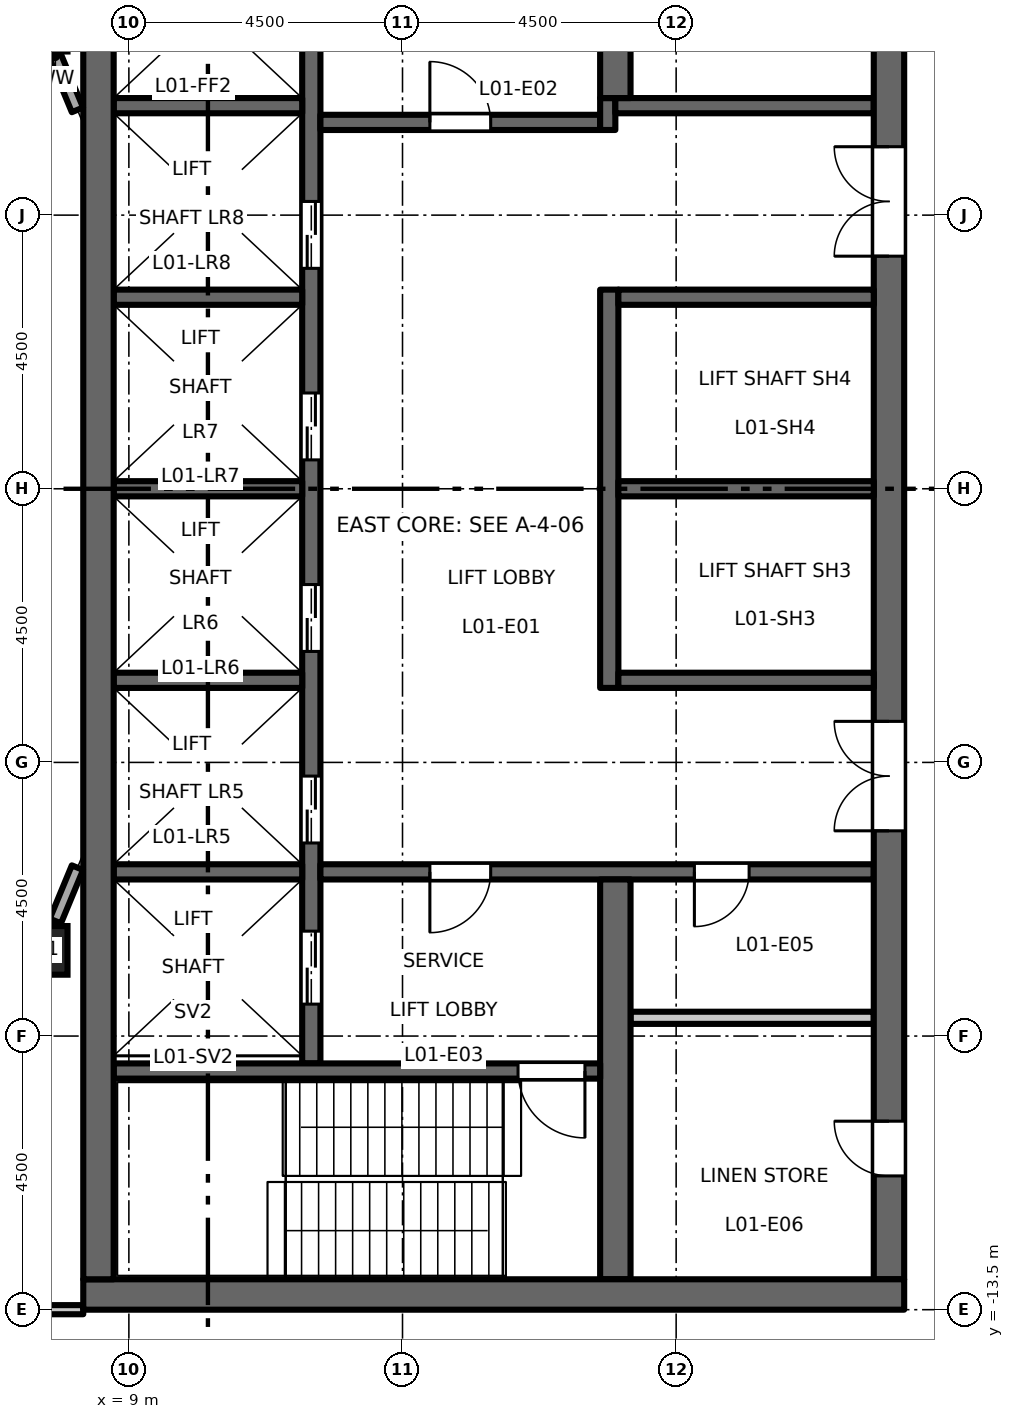
"""IFC4 building model, lengths in metres.
Left out: names, types, materials, properties, quantities, classifications, styles, units other than length and angle.
Written with IfcOpenShell. Run it as: python <this file> out.ifc"""

import sys

from ifc_helpers import new_model, si_unit, direction, frame, frame_2d, origin, origin_2d, place, context, subcontext, project, spatial, rectangle, hollow_rectangle, extrude, element, fill, save


model = new_model("IFC4")
c1 = context("Model", 3, precision=1e-05, world=origin(), true_north=direction((0.0, 1.0)))
c2 = subcontext(c1, "Body", "Model", "MODEL_VIEW")
j1 = project(units=[si_unit("LENGTHUNIT", "METRE"), si_unit("PLANEANGLEUNIT", "RADIAN")], contexts=[c1])
p1 = place(None, origin())
s1 = spatial("IfcSite", under=j1, at=p1, CompositionType="ELEMENT")
p2 = place(p1, origin())
s2 = spatial("IfcBuilding", under=s1, at=p2, CompositionType="ELEMENT")
p3 = place(p2, frame((0.0, 0.0, 7.2)))
s3 = spatial("IfcBuildingStorey", under=s2, at=p3, CompositionType="ELEMENT", Elevation=7.2)
p4 = place(p3, frame((7.591, -7.591, 0.0), z_axis=(0.0, 0.0, 1.0), x_axis=(1.0, 0.0, 0.0)))
e1 = element("IfcColumn", 1, at=p4, inside=s3, PredefinedType="COLUMN", context=c2, shape_type="SweptSolid", body=[
    extrude(hollow_rectangle(XDim=0.8, YDim=0.8, WallThickness=0.05, at=origin_2d()), origin(), (0.0, 0.0, 1.0), 5.0),
])
p5 = place(p3, frame((12.0, -9.45, 0.0), z_axis=(0.0, 0.0, 1.0), x_axis=(0.0, 1.0, 0.0)))
e2 = element("IfcWall", 2, at=p5, inside=s3, PredefinedType="SHEAR", context=c2, shape_type="SweptSolid", body=[
    extrude(rectangle(XDim=18.9, YDim=0.3, at=frame_2d((9.45, 0.0))), origin(), (0.0, 0.0, 1.0), 4.8),
])
p6 = place(p5, frame((3.625, 0.0, 0.0)))
e3 = element("IfcOpeningElement", 3, at=p6, cuts=e2, PredefinedType="OPENING", context=c2, shape_type="SweptSolid", body=[
    extrude(rectangle(XDim=1.1, YDim=2.1, at=frame_2d((0.55, 1.05))), frame((0.0, 0.16, 0.0), z_axis=(0.0, -1.0, 0.0), x_axis=(1.0, 0.0, 0.0)), (0.0, 0.0, 1.0), 0.32),
])
p7 = place(p5, frame((6.775, 0.0, 0.0)))
e4 = element("IfcOpeningElement", 4, at=p7, cuts=e2, PredefinedType="OPENING", context=c2, shape_type="SweptSolid", body=[
    extrude(rectangle(XDim=1.1, YDim=2.1, at=frame_2d((0.55, 1.05))), frame((0.0, 0.16, 0.0), z_axis=(0.0, -1.0, 0.0), x_axis=(1.0, 0.0, 0.0)), (0.0, 0.0, 1.0), 0.32),
])
p8 = place(p5, frame((9.925, 0.0, 0.0)))
e5 = element("IfcOpeningElement", 5, at=p8, cuts=e2, PredefinedType="OPENING", context=c2, shape_type="SweptSolid", body=[
    extrude(rectangle(XDim=1.1, YDim=2.1, at=frame_2d((0.55, 1.05))), frame((0.0, 0.16, 0.0), z_axis=(0.0, -1.0, 0.0), x_axis=(1.0, 0.0, 0.0)), (0.0, 0.0, 1.0), 0.32),
])
p9 = place(p5, frame((13.075, 0.0, 0.0)))
e6 = element("IfcOpeningElement", 6, at=p9, cuts=e2, PredefinedType="OPENING", context=c2, shape_type="SweptSolid", body=[
    extrude(rectangle(XDim=1.1, YDim=2.1, at=frame_2d((0.55, 1.05))), frame((0.0, 0.16, 0.0), z_axis=(0.0, -1.0, 0.0), x_axis=(1.0, 0.0, 0.0)), (0.0, 0.0, 1.0), 0.32),
])
p10 = place(p5, frame((16.725, 0.0, 0.0)))
e7 = element("IfcOpeningElement", 7, at=p10, cuts=e2, PredefinedType="OPENING", context=c2, shape_type="SweptSolid", body=[
    extrude(rectangle(XDim=1.2, YDim=2.1, at=frame_2d((0.6, 1.05))), frame((0.0, 0.16, 0.0), z_axis=(0.0, -1.0, 0.0), x_axis=(1.0, 0.0, 0.0)), (0.0, 0.0, 1.0), 0.32),
])
p11 = place(p5, frame((0.975, 0.0, 0.0)))
e8 = element("IfcOpeningElement", 8, at=p11, cuts=e2, PredefinedType="OPENING", context=c2, shape_type="SweptSolid", body=[
    extrude(rectangle(XDim=1.2, YDim=2.1, at=frame_2d((0.6, 1.05))), frame((0.0, 0.16, 0.0), z_axis=(0.0, -1.0, 0.0), x_axis=(1.0, 0.0, 0.0)), (0.0, 0.0, 1.0), 0.32),
])
p12 = place(p3, frame((12.15, 6.025, 0.0), z_axis=(0.0, 0.0, 1.0), x_axis=(1.0, 0.0, 0.0)))
e9 = element("IfcWall", 9, at=p12, inside=s3, PredefinedType="SHEAR", context=c2, shape_type="SweptSolid", body=[
    extrude(rectangle(XDim=4.6, YDim=0.25, at=frame_2d((2.3, 0.0))), origin(), (0.0, 0.0, 1.0), 4.8),
])
p13 = place(p12, frame((1.8, 0.0, 0.0)))
e10 = element("IfcOpeningElement", 10, at=p13, cuts=e9, PredefinedType="OPENING", context=c2, shape_type="SweptSolid", body=[
    extrude(rectangle(XDim=1.0, YDim=2.1, at=frame_2d((0.5, 1.05))), frame((0.0, 0.135, 0.0), z_axis=(0.0, -1.0, 0.0), x_axis=(1.0, 0.0, 0.0)), (0.0, 0.0, 1.0), 0.27),
])
p14 = place(p3, frame((16.875, 5.9, 0.0), z_axis=(0.0, 0.0, 1.0), x_axis=(0.0, 1.0, 0.0)))
e11 = element("IfcWall", 11, at=p14, inside=s3, PredefinedType="SHEAR", context=c2, shape_type="SweptSolid", body=[
    extrude(rectangle(XDim=0.525, YDim=0.25, at=frame_2d((0.263, 0.0))), origin(), (0.0, 0.0, 1.0), 4.8),
])
p15 = place(p3, frame((17.0, 6.3, 0.0), z_axis=(0.0, 0.0, 1.0), x_axis=(1.0, 0.0, 0.0)))
e12 = element("IfcWall", 12, at=p15, inside=s3, PredefinedType="SHEAR", context=c2, shape_type="SweptSolid", body=[
    extrude(rectangle(XDim=4.25, YDim=0.25, at=frame_2d((2.125, 0.0))), origin(), (0.0, 0.0, 1.0), 4.8),
])
p16 = place(p3, frame((12.15, -6.3, 0.0), z_axis=(0.0, 0.0, 1.0), x_axis=(1.0, 0.0, 0.0)))
e13 = element("IfcWall", 13, at=p16, inside=s3, PredefinedType="SHEAR", context=c2, shape_type="SweptSolid", body=[
    extrude(rectangle(XDim=9.1, YDim=0.25, at=frame_2d((4.55, 0.0))), origin(), (0.0, 0.0, 1.0), 4.8),
])
p17 = place(p16, frame((1.8, 0.0, 0.0)))
e14 = element("IfcOpeningElement", 14, at=p17, cuts=e13, PredefinedType="OPENING", context=c2, shape_type="SweptSolid", body=[
    extrude(rectangle(XDim=1.0, YDim=2.1, at=frame_2d((0.5, 1.05))), frame((0.0, 0.135, 0.0), z_axis=(0.0, -1.0, 0.0), x_axis=(1.0, 0.0, 0.0)), (0.0, 0.0, 1.0), 0.27),
])
p18 = place(p16, frame((6.15, 0.0, 0.0)))
e15 = element("IfcOpeningElement", 15, at=p18, cuts=e13, PredefinedType="OPENING", context=c2, shape_type="SweptSolid", body=[
    extrude(rectangle(XDim=0.9, YDim=2.1, at=frame_2d((0.45, 1.05))), frame((0.0, 0.135, 0.0), z_axis=(0.0, -1.0, 0.0), x_axis=(1.0, 0.0, 0.0)), (0.0, 0.0, 1.0), 0.27),
])
p19 = place(p3, frame((21.5, -13.0, 0.0), z_axis=(0.0, 0.0, 1.0), x_axis=(0.0, 1.0, 0.0)))
e16 = element("IfcWall", 16, at=p19, inside=s3, PredefinedType="SHEAR", context=c2, shape_type="SweptSolid", body=[
    extrude(rectangle(XDim=26.0, YDim=0.5, at=frame_2d((13.0, 0.0))), origin(), (0.0, 0.0, 1.0), 4.8),
])
p20 = place(p19, frame((16.825, 0.0, 0.0)))
e17 = element("IfcOpeningElement", 17, at=p20, cuts=e16, PredefinedType="OPENING", context=c2, shape_type="SweptSolid", body=[
    extrude(rectangle(XDim=1.8, YDim=2.1, at=frame_2d((0.9, 1.05))), frame((0.0, 0.26, 0.0), z_axis=(0.0, -1.0, 0.0), x_axis=(1.0, 0.0, 0.0)), (0.0, 0.0, 1.0), 0.52),
])
p21 = place(p19, frame((7.375, 0.0, 0.0)))
e18 = element("IfcOpeningElement", 18, at=p21, cuts=e16, PredefinedType="OPENING", context=c2, shape_type="SweptSolid", body=[
    extrude(rectangle(XDim=1.8, YDim=2.1, at=frame_2d((0.9, 1.05))), frame((0.0, 0.26, 0.0), z_axis=(0.0, -1.0, 0.0), x_axis=(1.0, 0.0, 0.0)), (0.0, 0.0, 1.0), 0.52),
])
p22 = place(p19, frame((22.45, 0.0, 0.0)))
e19 = element("IfcOpeningElement", 19, at=p22, cuts=e16, PredefinedType="OPENING", context=c2, shape_type="SweptSolid", body=[
    extrude(rectangle(XDim=0.9, YDim=2.1, at=frame_2d((0.45, 1.05))), frame((0.0, 0.26, 0.0), z_axis=(0.0, -1.0, 0.0), x_axis=(1.0, 0.0, 0.0)), (0.0, 0.0, 1.0), 0.52),
])
p23 = place(p19, frame((1.7, 0.0, 0.0)))
e20 = element("IfcOpeningElement", 20, at=p23, cuts=e16, PredefinedType="OPENING", context=c2, shape_type="SweptSolid", body=[
    extrude(rectangle(XDim=0.9, YDim=2.1, at=frame_2d((0.45, 1.05))), frame((0.0, 0.26, 0.0), z_axis=(0.0, -1.0, 0.0), x_axis=(1.0, 0.0, 0.0)), (0.0, 0.0, 1.0), 0.52),
])
p24 = place(p3, frame((17.25, -8.7, 0.0), z_axis=(0.0, 0.0, 1.0), x_axis=(1.0, 0.0, 0.0)))
e21 = element("IfcWall", 21, at=p24, inside=s3, PredefinedType="PARTITIONING", context=c2, shape_type="SweptSolid", body=[
    extrude(rectangle(XDim=4.0, YDim=0.2, at=frame_2d((2.0, 0.0))), origin(), (0.0, 0.0, 1.0), 4.8),
])
p25 = place(p3, frame((16.9, -3.275, 0.0), z_axis=(0.0, 0.0, 1.0), x_axis=(0.0, 1.0, 0.0)))
e22 = element("IfcWall", 22, at=p25, inside=s3, PredefinedType="SHEAR", context=c2, shape_type="SweptSolid", body=[
    extrude(rectangle(XDim=6.55, YDim=0.3, at=frame_2d((3.275, 0.0))), origin(), (0.0, 0.0, 1.0), 4.8),
])
for number, where, z_axis, x_axis in (
    (23, (17.05, 0.0, 0.0), (0.0, 0.0, 1.0), (1.0, 0.0, 0.0)),
    (24, (17.05, 3.15, 0.0), (0.0, 0.0, 1.0), (1.0, 0.0, 0.0)),
    (25, (17.05, -3.15, 0.0), (0.0, 0.0, 1.0), (1.0, 0.0, 0.0)),
):
    element("IfcWall", number, at=place(p3, frame(where, z_axis=z_axis, x_axis=x_axis)), inside=s3, PredefinedType="SHEAR", context=c2, shape_type="SweptSolid", body=[
        extrude(rectangle(XDim=4.2, YDim=0.25, at=frame_2d((2.1, 0.0))), origin(), (0.0, 0.0, 1.0), 4.8),
    ])
for number, where, z_axis, x_axis in (
    (26, (17.0, 6.425, 0.0), (0.0, 0.0, 1.0), (0.0, 1.0, 0.0)),
    (27, (17.0, -13.0, 0.0), (0.0, 0.0, 1.0), (0.0, 1.0, 0.0)),
):
    element("IfcWall", number, at=place(p3, frame(where, z_axis=z_axis, x_axis=x_axis)), inside=s3, PredefinedType="SHEAR", context=c2, shape_type="SweptSolid", body=[
        extrude(rectangle(XDim=6.575, YDim=0.5, at=frame_2d((3.288, 0.0))), origin(), (0.0, 0.0, 1.0), 4.8),
    ])
for number, where, z_axis, x_axis in (
    (28, (8.75, 0.0, 0.0), (0.0, 0.0, 1.0), (1.0, 0.0, 0.0)),
    (29, (8.75, 3.15, 0.0), (0.0, 0.0, 1.0), (1.0, 0.0, 0.0)),
    (30, (8.75, 6.3, 0.0), (0.0, 0.0, 1.0), (1.0, 0.0, 0.0)),
    (31, (8.75, -3.15, 0.0), (0.0, 0.0, 1.0), (1.0, 0.0, 0.0)),
    (32, (8.75, -6.3, 0.0), (0.0, 0.0, 1.0), (1.0, 0.0, 0.0)),
):
    element("IfcWall", number, at=place(p3, frame(where, z_axis=z_axis, x_axis=x_axis)), inside=s3, PredefinedType="SHEAR", context=c2, shape_type="SweptSolid", body=[
        extrude(rectangle(XDim=3.1, YDim=0.25, at=frame_2d((1.55, 0.0))), origin(), (0.0, 0.0, 1.0), 4.8),
    ])
p26 = place(p3, frame((8.75, -9.575, 0.0), z_axis=(0.0, 0.0, 1.0), x_axis=(1.0, 0.0, 0.0)))
e33 = element("IfcWall", 33, at=p26, inside=s3, PredefinedType="SHEAR", context=c2, shape_type="SweptSolid", body=[
    extrude(rectangle(XDim=8.0, YDim=0.25, at=frame_2d((4.0, 0.0))), origin(), (0.0, 0.0, 1.0), 4.8),
])
p27 = place(p26, frame((6.65, 0.0, 0.0)))
e34 = element("IfcOpeningElement", 34, at=p27, cuts=e33, PredefinedType="OPENING", context=c2, shape_type="SweptSolid", body=[
    extrude(rectangle(XDim=1.1, YDim=2.1, at=frame_2d((0.55, 1.05))), frame((0.0, 0.135, 0.0), z_axis=(0.0, -1.0, 0.0), x_axis=(1.0, 0.0, 0.0)), (0.0, 0.0, 1.0), 0.27),
])
p28 = place(p3, frame((8.25, -13.25, 0.0), z_axis=(0.0, 0.0, 1.0), x_axis=(1.0, 0.0, 0.0)))
e35 = element("IfcWall", 35, at=p28, inside=s3, PredefinedType="SHEAR", context=c2, shape_type="SweptSolid", body=[
    extrude(rectangle(XDim=13.5, YDim=0.5, at=frame_2d((6.75, 0.0))), origin(), (0.0, 0.0, 1.0), 4.8),
])
p29 = place(p3, frame((8.5, -13.0, 0.0), z_axis=(0.0, 0.0, 1.0), x_axis=(0.0, 1.0, 0.0)))
e36 = element("IfcWall", 36, at=p29, inside=s3, PredefinedType="SHEAR", context=c2, shape_type="SweptSolid", body=[
    extrude(rectangle(XDim=26.0, YDim=0.5, at=frame_2d((13.0, 0.0))), origin(), (0.0, 0.0, 1.0), 4.8),
])
for number, where, z_axis, x_axis in (
    (37, (7.791, -7.108, 0.0), (0.0, 0.0, 1.0), (0.383, 0.924, 0.0)),
    (38, (8.154, 6.231, 0.0), (0.0, 0.0, 1.0), (-0.383, 0.924, 0.0)),
):
    element("IfcWall", number, at=place(p3, frame(where, z_axis=z_axis, x_axis=x_axis)), inside=s3, PredefinedType="STANDARD", context=c2, shape_type="SweptSolid", body=[
        extrude(rectangle(XDim=0.949, YDim=0.2, at=frame_2d((0.475, 0.0))), origin(), (0.0, 0.0, 1.0), 4.18),
    ])
p30 = place(p3, frame((-8.25, -13.5, 0.0), z_axis=(0.0, 0.0, 1.0), x_axis=(1.0, 0.0, 0.0)))
e39 = element("IfcWall", 39, at=p30, inside=s3, PredefinedType="PARTITIONING", context=c2, shape_type="SweptSolid", body=[
    extrude(rectangle(XDim=16.5, YDim=0.15, at=frame_2d((8.25, 0.0))), origin(), (0.0, 0.0, 1.0), 4.3),
])
p31 = place(p30, frame((0.6, 0.0, 0.0)))
e40 = element("IfcOpeningElement", 40, at=p31, cuts=e39, PredefinedType="OPENING", context=c2, shape_type="SweptSolid", body=[
    extrude(rectangle(XDim=1.0, YDim=2.1, at=frame_2d((0.5, 1.05))), frame((0.0, 0.085, 0.0), z_axis=(0.0, -1.0, 0.0), x_axis=(1.0, 0.0, 0.0)), (0.0, 0.0, 1.0), 0.17),
])
p32 = place(p13, origin())
e41 = element("IfcDoor", 41, at=p32, inside=s3, OperationType="SINGLE_SWING_RIGHT", PredefinedType="DOOR", context=c2, shape_type="SweptSolid", body=[
    extrude(rectangle(XDim=1.0, YDim=2.1, at=frame_2d((0.5, 1.05))), frame((0.0, 0.025, 0.0), z_axis=(0.0, -1.0, 0.0), x_axis=(1.0, 0.0, 0.0)), (0.0, 0.0, 1.0), 0.05),
])
fill(e10, e41)
p33 = place(p17, origin())
e42 = element("IfcDoor", 42, at=p33, inside=s3, OperationType="SINGLE_SWING_LEFT", PredefinedType="DOOR", context=c2, shape_type="SweptSolid", body=[
    extrude(rectangle(XDim=1.0, YDim=2.1, at=frame_2d((0.5, 1.05))), frame((0.0, 0.025, 0.0), z_axis=(0.0, -1.0, 0.0), x_axis=(1.0, 0.0, 0.0)), (0.0, 0.0, 1.0), 0.05),
])
fill(e14, e42)
p34 = place(p27, origin())
e43 = element("IfcDoor", 43, at=p34, inside=s3, OperationType="SINGLE_SWING_RIGHT", PredefinedType="DOOR", context=c2, shape_type="SweptSolid", body=[
    extrude(rectangle(XDim=1.1, YDim=2.1, at=frame_2d((0.55, 1.05))), frame((0.0, 0.025, 0.0), z_axis=(0.0, -1.0, 0.0), x_axis=(1.0, 0.0, 0.0)), (0.0, 0.0, 1.0), 0.05),
])
fill(e34, e43)
p35 = place(p20, origin())
e44 = element("IfcDoor", 44, at=p35, inside=s3, OperationType="DOUBLE_DOOR_DOUBLE_SWING", PredefinedType="DOOR", context=c2, shape_type="SweptSolid", body=[
    extrude(rectangle(XDim=1.8, YDim=2.1, at=frame_2d((0.9, 1.05))), frame((0.0, 0.025, 0.0), z_axis=(0.0, -1.0, 0.0), x_axis=(1.0, 0.0, 0.0)), (0.0, 0.0, 1.0), 0.05),
])
fill(e17, e44)
p36 = place(p21, origin())
e45 = element("IfcDoor", 45, at=p36, inside=s3, OperationType="DOUBLE_DOOR_DOUBLE_SWING", PredefinedType="DOOR", context=c2, shape_type="SweptSolid", body=[
    extrude(rectangle(XDim=1.8, YDim=2.1, at=frame_2d((0.9, 1.05))), frame((0.0, 0.025, 0.0), z_axis=(0.0, -1.0, 0.0), x_axis=(1.0, 0.0, 0.0)), (0.0, 0.0, 1.0), 0.05),
])
fill(e18, e45)
p37 = place(p6, origin())
e46 = element("IfcDoor", 46, at=p37, inside=s3, OperationType="DOUBLE_DOOR_SLIDING", PredefinedType="DOOR", context=c2, shape_type="SweptSolid", body=[
    extrude(rectangle(XDim=1.1, YDim=2.1, at=frame_2d((0.55, 1.05))), frame((0.0, 0.025, 0.0), z_axis=(0.0, -1.0, 0.0), x_axis=(1.0, 0.0, 0.0)), (0.0, 0.0, 1.0), 0.05),
])
fill(e3, e46)
p38 = place(p7, origin())
e47 = element("IfcDoor", 47, at=p38, inside=s3, OperationType="DOUBLE_DOOR_SLIDING", PredefinedType="DOOR", context=c2, shape_type="SweptSolid", body=[
    extrude(rectangle(XDim=1.1, YDim=2.1, at=frame_2d((0.55, 1.05))), frame((0.0, 0.025, 0.0), z_axis=(0.0, -1.0, 0.0), x_axis=(1.0, 0.0, 0.0)), (0.0, 0.0, 1.0), 0.05),
])
fill(e4, e47)
p39 = place(p8, origin())
e48 = element("IfcDoor", 48, at=p39, inside=s3, OperationType="DOUBLE_DOOR_SLIDING", PredefinedType="DOOR", context=c2, shape_type="SweptSolid", body=[
    extrude(rectangle(XDim=1.1, YDim=2.1, at=frame_2d((0.55, 1.05))), frame((0.0, 0.025, 0.0), z_axis=(0.0, -1.0, 0.0), x_axis=(1.0, 0.0, 0.0)), (0.0, 0.0, 1.0), 0.05),
])
fill(e5, e48)
p40 = place(p9, origin())
e49 = element("IfcDoor", 49, at=p40, inside=s3, OperationType="DOUBLE_DOOR_SLIDING", PredefinedType="DOOR", context=c2, shape_type="SweptSolid", body=[
    extrude(rectangle(XDim=1.1, YDim=2.1, at=frame_2d((0.55, 1.05))), frame((0.0, 0.025, 0.0), z_axis=(0.0, -1.0, 0.0), x_axis=(1.0, 0.0, 0.0)), (0.0, 0.0, 1.0), 0.05),
])
fill(e6, e49)
p41 = place(p11, origin())
e50 = element("IfcDoor", 50, at=p41, inside=s3, OperationType="DOUBLE_DOOR_SLIDING", PredefinedType="DOOR", context=c2, shape_type="SweptSolid", body=[
    extrude(rectangle(XDim=1.2, YDim=2.1, at=frame_2d((0.6, 1.05))), frame((0.0, 0.025, 0.0), z_axis=(0.0, -1.0, 0.0), x_axis=(1.0, 0.0, 0.0)), (0.0, 0.0, 1.0), 0.05),
])
fill(e8, e50)
p42 = place(p18, origin())
e51 = element("IfcDoor", 51, at=p42, inside=s3, OperationType="SINGLE_SWING_LEFT", PredefinedType="DOOR", context=c2, shape_type="SweptSolid", body=[
    extrude(rectangle(XDim=0.9, YDim=2.1, at=frame_2d((0.45, 1.05))), frame((0.0, 0.025, 0.0), z_axis=(0.0, -1.0, 0.0), x_axis=(1.0, 0.0, 0.0)), (0.0, 0.0, 1.0), 0.05),
])
fill(e15, e51)
p43 = place(p23, origin())
e52 = element("IfcDoor", 52, at=p43, inside=s3, OperationType="SINGLE_SWING_LEFT", PredefinedType="DOOR", context=c2, shape_type="SweptSolid", body=[
    extrude(rectangle(XDim=0.9, YDim=2.1, at=frame_2d((0.45, 1.05))), frame((0.0, 0.025, 0.0), z_axis=(0.0, -1.0, 0.0), x_axis=(1.0, 0.0, 0.0)), (0.0, 0.0, 1.0), 0.05),
])
fill(e20, e52)
save(model, sys.argv[1])
